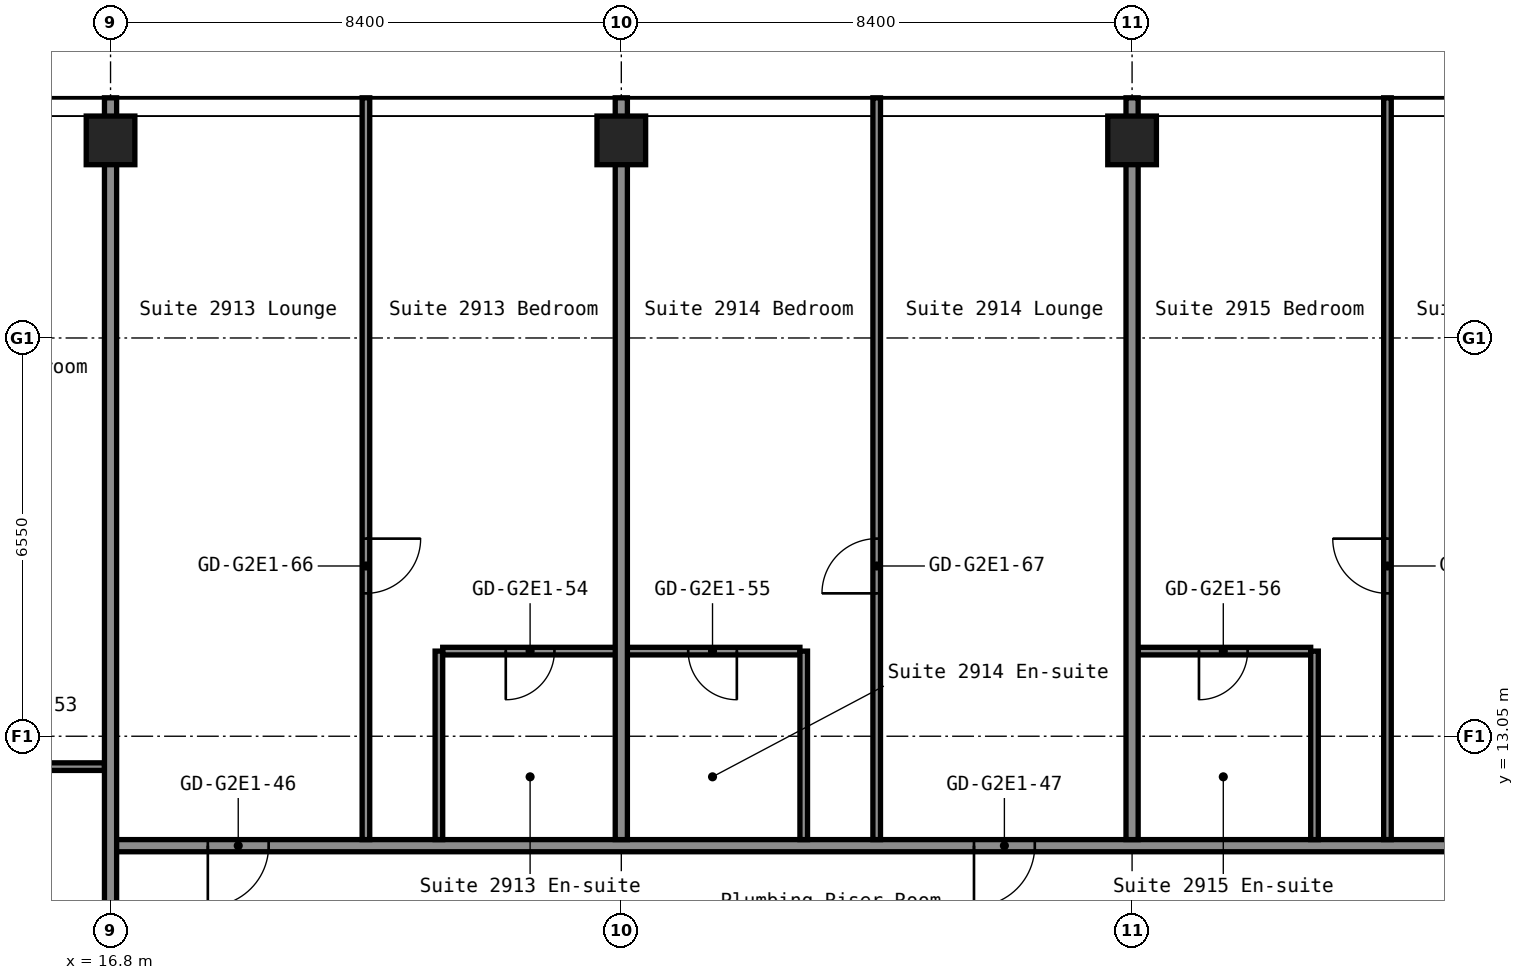
"""IFC4 building model, lengths in metres.
Left out: names, types, materials, properties, quantities, classifications, styles, units other than length and angle.
Written with IfcOpenShell. Run it as: python <this file> out.ifc"""

import sys

from ifc_helpers import new_model, si_unit, direction, frame, frame_2d, origin, origin_2d, place, context, subcontext, project, spatial, rectangle, hollow_rectangle, extrude, element, fill, save


model = new_model("IFC4")
c1 = context("Model", 3, precision=1e-05, world=origin(), true_north=direction((0.0, 1.0)))
c2 = subcontext(c1, "Body", "Model", "MODEL_VIEW")
j1 = project(units=[si_unit("LENGTHUNIT", "METRE"), si_unit("PLANEANGLEUNIT", "RADIAN")], contexts=[c1])
p1 = place(None, origin())
s1 = spatial("IfcSite", under=j1, at=p1, CompositionType="ELEMENT")
p2 = place(p1, origin())
s2 = spatial("IfcBuilding", under=s1, at=p2, CompositionType="ELEMENT")
p3 = place(p2, frame((0.0, 0.0, 104.2)))
s3 = spatial("IfcBuildingStorey", under=s2, at=p3, CompositionType="ELEMENT", Elevation=104.2)
for number, where, z_axis, x_axis in (
    (1, (16.8, 22.85, 0.0), (0.0, 0.0, 1.0), (1.0, 0.0, 0.0)),
    (2, (25.2, 22.85, 0.0), (0.0, 0.0, 1.0), (1.0, 0.0, 0.0)),
    (3, (33.6, 22.85, 0.0), (0.0, 0.0, 1.0), (1.0, 0.0, 0.0)),
):
    element("IfcColumn", number, at=place(p3, frame(where, z_axis=z_axis, x_axis=x_axis)), inside=s3, PredefinedType="COLUMN", context=c2, shape_type="SweptSolid", body=[
        extrude(hollow_rectangle(XDim=0.8, YDim=0.8, WallThickness=0.032, at=origin_2d()), origin(), (0.0, 0.0, 1.0), 2.8),
    ])
p4 = place(p3, frame((16.8, 11.25, 0.0), z_axis=(0.0, 0.0, 1.0), x_axis=(1.0, 0.0, 0.0)))
e4 = element("IfcWall", 4, at=p4, inside=s3, PredefinedType="PARTITIONING", context=c2, shape_type="SweptSolid", body=[
    extrude(rectangle(XDim=29.7, YDim=0.2, at=frame_2d((14.85, 0.0))), origin(), (0.0, 0.0, 1.0), 2.8),
])
p5 = place(p4, frame((1.6, 0.0, 0.0)))
e5 = element("IfcOpeningElement", 5, at=p5, cuts=e4, PredefinedType="OPENING", context=c2, shape_type="SweptSolid", body=[
    extrude(rectangle(XDim=1.0, YDim=2.1, at=frame_2d((0.5, 1.05))), frame((0.0, 0.11, 0.0), z_axis=(0.0, -1.0, 0.0), x_axis=(1.0, 0.0, 0.0)), (0.0, 0.0, 1.0), 0.22),
])
p6 = place(p4, frame((14.2, 0.0, 0.0)))
e6 = element("IfcOpeningElement", 6, at=p6, cuts=e4, PredefinedType="OPENING", context=c2, shape_type="SweptSolid", body=[
    extrude(rectangle(XDim=1.0, YDim=2.1, at=frame_2d((0.5, 1.05))), frame((0.0, 0.11, 0.0), z_axis=(0.0, -1.0, 0.0), x_axis=(1.0, 0.0, 0.0)), (0.0, 0.0, 1.0), 0.22),
])
p7 = place(p4, frame((22.6, 0.0, 0.0)))
e7 = element("IfcOpeningElement", 7, at=p7, cuts=e4, PredefinedType="OPENING", context=c2, shape_type="SweptSolid", body=[
    extrude(rectangle(XDim=1.0, YDim=2.1, at=frame_2d((0.5, 1.05))), frame((0.0, 0.11, 0.0), z_axis=(0.0, -1.0, 0.0), x_axis=(1.0, 0.0, 0.0)), (0.0, 0.0, 1.0), 0.22),
])
p8 = place(p4, frame((26.85, 0.0, 0.0)))
e8 = element("IfcOpeningElement", 8, at=p8, cuts=e4, PredefinedType="OPENING", context=c2, shape_type="SweptSolid", body=[
    extrude(rectangle(XDim=0.9, YDim=2.1, at=frame_2d((0.45, 1.05))), frame((0.0, 0.11, 0.0), z_axis=(0.0, -1.0, 0.0), x_axis=(1.0, 0.0, 0.0)), (0.0, 0.0, 1.0), 0.22),
])
p9 = place(p3, frame((13.863, 12.55, 0.0), z_axis=(0.0, 0.0, 1.0), x_axis=(1.0, 0.0, 0.0)))
e9 = element("IfcWall", 9, at=p9, inside=s3, PredefinedType="PARTITIONING", context=c2, shape_type="SweptSolid", body=[
    extrude(rectangle(XDim=2.837, YDim=0.125, at=frame_2d((1.419, 0.0))), origin(), (0.0, 0.0, 1.0), 2.8),
])
p10 = place(p9, frame((1.038, 0.0, 0.0)))
e10 = element("IfcOpeningElement", 10, at=p10, cuts=e9, PredefinedType="OPENING", context=c2, shape_type="SweptSolid", body=[
    extrude(rectangle(XDim=0.8, YDim=2.1, at=frame_2d((0.4, 1.05))), frame((0.0, 0.073, 0.0), z_axis=(0.0, -1.0, 0.0), x_axis=(1.0, 0.0, 0.0)), (0.0, 0.0, 1.0), 0.145),
])
p11 = place(p3, frame((22.262, 14.45, 0.0), z_axis=(0.0, 0.0, 1.0), x_axis=(1.0, 0.0, 0.0)))
e11 = element("IfcWall", 11, at=p11, inside=s3, PredefinedType="PARTITIONING", context=c2, shape_type="SweptSolid", body=[
    extrude(rectangle(XDim=5.875, YDim=0.125, at=frame_2d((2.938, 0.0))), origin(), (0.0, 0.0, 1.0), 2.8),
])
p12 = place(p11, frame((1.038, 0.0, 0.0)))
e12 = element("IfcOpeningElement", 12, at=p12, cuts=e11, PredefinedType="OPENING", context=c2, shape_type="SweptSolid", body=[
    extrude(rectangle(XDim=0.8, YDim=2.1, at=frame_2d((0.4, 1.05))), frame((0.0, 0.073, 0.0), z_axis=(0.0, -1.0, 0.0), x_axis=(1.0, 0.0, 0.0)), (0.0, 0.0, 1.0), 0.145),
])
p13 = place(p11, frame((4.038, 0.0, 0.0)))
e13 = element("IfcOpeningElement", 13, at=p13, cuts=e11, PredefinedType="OPENING", context=c2, shape_type="SweptSolid", body=[
    extrude(rectangle(XDim=0.8, YDim=2.1, at=frame_2d((0.4, 1.05))), frame((0.0, 0.073, 0.0), z_axis=(0.0, -1.0, 0.0), x_axis=(1.0, 0.0, 0.0)), (0.0, 0.0, 1.0), 0.145),
])
p14 = place(p3, frame((33.7, 14.45, 0.0), z_axis=(0.0, 0.0, 1.0), x_axis=(1.0, 0.0, 0.0)))
e14 = element("IfcWall", 14, at=p14, inside=s3, PredefinedType="PARTITIONING", context=c2, shape_type="SweptSolid", body=[
    extrude(rectangle(XDim=2.838, YDim=0.125, at=frame_2d((1.419, 0.0))), origin(), (0.0, 0.0, 1.0), 2.8),
])
p15 = place(p14, frame((1.0, 0.0, 0.0)))
e15 = element("IfcOpeningElement", 15, at=p15, cuts=e14, PredefinedType="OPENING", context=c2, shape_type="SweptSolid", body=[
    extrude(rectangle(XDim=0.8, YDim=2.1, at=frame_2d((0.4, 1.05))), frame((0.0, 0.073, 0.0), z_axis=(0.0, -1.0, 0.0), x_axis=(1.0, 0.0, 0.0)), (0.0, 0.0, 1.0), 0.145),
])
p16 = place(p3, frame((16.8, 10.19, 0.0), z_axis=(0.0, 0.0, 1.0), x_axis=(0.0, 1.0, 0.0)))
e16 = element("IfcWall", 16, at=p16, inside=s3, PredefinedType="PARTITIONING", context=c2, shape_type="SweptSolid", body=[
    extrude(rectangle(XDim=13.36, YDim=0.2, at=frame_2d((6.68, 0.0))), origin(), (0.0, 0.0, 1.0), 2.8),
])
p17 = place(p3, frame((21.0, 11.35, 0.0), z_axis=(0.0, 0.0, 1.0), x_axis=(0.0, 1.0, 0.0)))
e17 = element("IfcWall", 17, at=p17, inside=s3, PredefinedType="PARTITIONING", context=c2, shape_type="SweptSolid", body=[
    extrude(rectangle(XDim=12.2, YDim=0.125, at=frame_2d((6.1, 0.0))), origin(), (0.0, 0.0, 1.0), 2.8),
])
p18 = place(p17, frame((4.05, 0.0, 0.0)))
e18 = element("IfcOpeningElement", 18, at=p18, cuts=e17, PredefinedType="OPENING", context=c2, shape_type="SweptSolid", body=[
    extrude(rectangle(XDim=0.9, YDim=2.1, at=frame_2d((0.45, 1.05))), frame((0.0, 0.073, 0.0), z_axis=(0.0, -1.0, 0.0), x_axis=(1.0, 0.0, 0.0)), (0.0, 0.0, 1.0), 0.145),
])
p19 = place(p3, frame((22.2, 11.35, 0.0), z_axis=(0.0, 0.0, 1.0), x_axis=(0.0, 1.0, 0.0)))
e19 = element("IfcWall", 19, at=p19, inside=s3, PredefinedType="PARTITIONING", context=c2, shape_type="SweptSolid", body=[
    extrude(rectangle(XDim=3.1, YDim=0.125, at=frame_2d((1.55, 0.0))), origin(), (0.0, 0.0, 1.0), 2.8),
])
p20 = place(p3, frame((25.2, 11.35, 0.0), z_axis=(0.0, 0.0, 1.0), x_axis=(0.0, 1.0, 0.0)))
e20 = element("IfcWall", 20, at=p20, inside=s3, PredefinedType="PARTITIONING", context=c2, shape_type="SweptSolid", body=[
    extrude(rectangle(XDim=12.2, YDim=0.2, at=frame_2d((6.1, 0.0))), origin(), (0.0, 0.0, 1.0), 2.8),
])
p21 = place(p3, frame((28.2, 11.35, 0.0), z_axis=(0.0, 0.0, 1.0), x_axis=(0.0, 1.0, 0.0)))
e21 = element("IfcWall", 21, at=p21, inside=s3, PredefinedType="PARTITIONING", context=c2, shape_type="SweptSolid", body=[
    extrude(rectangle(XDim=3.1, YDim=0.125, at=frame_2d((1.55, 0.0))), origin(), (0.0, 0.0, 1.0), 2.8),
])
p22 = place(p3, frame((29.4, 11.35, 0.0), z_axis=(0.0, 0.0, 1.0), x_axis=(0.0, 1.0, 0.0)))
e22 = element("IfcWall", 22, at=p22, inside=s3, PredefinedType="PARTITIONING", context=c2, shape_type="SweptSolid", body=[
    extrude(rectangle(XDim=12.2, YDim=0.125, at=frame_2d((6.1, 0.0))), origin(), (0.0, 0.0, 1.0), 2.8),
])
p23 = place(p22, frame((4.05, 0.0, 0.0)))
e23 = element("IfcOpeningElement", 23, at=p23, cuts=e22, PredefinedType="OPENING", context=c2, shape_type="SweptSolid", body=[
    extrude(rectangle(XDim=0.9, YDim=2.1, at=frame_2d((0.45, 1.05))), frame((0.0, 0.073, 0.0), z_axis=(0.0, -1.0, 0.0), x_axis=(1.0, 0.0, 0.0)), (0.0, 0.0, 1.0), 0.145),
])
p24 = place(p3, frame((33.6, 11.35, 0.0), z_axis=(0.0, 0.0, 1.0), x_axis=(0.0, 1.0, 0.0)))
e24 = element("IfcWall", 24, at=p24, inside=s3, PredefinedType="PARTITIONING", context=c2, shape_type="SweptSolid", body=[
    extrude(rectangle(XDim=12.2, YDim=0.2, at=frame_2d((6.1, 0.0))), origin(), (0.0, 0.0, 1.0), 2.8),
])
p25 = place(p3, frame((36.6, 11.35, 0.0), z_axis=(0.0, 0.0, 1.0), x_axis=(0.0, 1.0, 0.0)))
e25 = element("IfcWall", 25, at=p25, inside=s3, PredefinedType="PARTITIONING", context=c2, shape_type="SweptSolid", body=[
    extrude(rectangle(XDim=3.1, YDim=0.125, at=frame_2d((1.55, 0.0))), origin(), (0.0, 0.0, 1.0), 2.8),
])
p26 = place(p3, frame((37.8, 11.35, 0.0), z_axis=(0.0, 0.0, 1.0), x_axis=(0.0, 1.0, 0.0)))
e26 = element("IfcWall", 26, at=p26, inside=s3, PredefinedType="PARTITIONING", context=c2, shape_type="SweptSolid", body=[
    extrude(rectangle(XDim=12.2, YDim=0.125, at=frame_2d((6.1, 0.0))), origin(), (0.0, 0.0, 1.0), 2.8),
])
p27 = place(p26, frame((4.05, 0.0, 0.0)))
e27 = element("IfcOpeningElement", 27, at=p27, cuts=e26, PredefinedType="OPENING", context=c2, shape_type="SweptSolid", body=[
    extrude(rectangle(XDim=0.9, YDim=2.1, at=frame_2d((0.45, 1.05))), frame((0.0, 0.073, 0.0), z_axis=(0.0, -1.0, 0.0), x_axis=(1.0, 0.0, 0.0)), (0.0, 0.0, 1.0), 0.145),
])
p28 = place(p5, origin())
e28 = element("IfcDoor", 28, at=p28, inside=s3, OperationType="SINGLE_SWING_LEFT", PredefinedType="DOOR", context=c2, shape_type="SweptSolid", body=[
    extrude(rectangle(XDim=1.0, YDim=2.1, at=frame_2d((0.5, 1.05))), frame((0.0, 0.025, 0.0), z_axis=(0.0, -1.0, 0.0), x_axis=(1.0, 0.0, 0.0)), (0.0, 0.0, 1.0), 0.05),
])
fill(e5, e28)
p29 = place(p6, origin())
e29 = element("IfcDoor", 29, at=p29, inside=s3, OperationType="SINGLE_SWING_LEFT", PredefinedType="DOOR", context=c2, shape_type="SweptSolid", body=[
    extrude(rectangle(XDim=1.0, YDim=2.1, at=frame_2d((0.5, 1.05))), frame((0.0, 0.025, 0.0), z_axis=(0.0, -1.0, 0.0), x_axis=(1.0, 0.0, 0.0)), (0.0, 0.0, 1.0), 0.05),
])
fill(e6, e29)
p30 = place(p12, origin())
e30 = element("IfcDoor", 30, at=p30, inside=s3, OperationType="SINGLE_SWING_LEFT", PredefinedType="DOOR", context=c2, shape_type="SweptSolid", body=[
    extrude(rectangle(XDim=0.8, YDim=2.1, at=frame_2d((0.4, 1.05))), frame((0.0, 0.025, 0.0), z_axis=(0.0, -1.0, 0.0), x_axis=(1.0, 0.0, 0.0)), (0.0, 0.0, 1.0), 0.05),
])
fill(e12, e30)
p31 = place(p13, origin())
e31 = element("IfcDoor", 31, at=p31, inside=s3, OperationType="SINGLE_SWING_RIGHT", PredefinedType="DOOR", context=c2, shape_type="SweptSolid", body=[
    extrude(rectangle(XDim=0.8, YDim=2.1, at=frame_2d((0.4, 1.05))), frame((0.0, 0.025, 0.0), z_axis=(0.0, -1.0, 0.0), x_axis=(1.0, 0.0, 0.0)), (0.0, 0.0, 1.0), 0.05),
])
fill(e13, e31)
p32 = place(p15, origin())
e32 = element("IfcDoor", 32, at=p32, inside=s3, OperationType="SINGLE_SWING_LEFT", PredefinedType="DOOR", context=c2, shape_type="SweptSolid", body=[
    extrude(rectangle(XDim=0.8, YDim=2.1, at=frame_2d((0.4, 1.05))), frame((0.0, 0.025, 0.0), z_axis=(0.0, -1.0, 0.0), x_axis=(1.0, 0.0, 0.0)), (0.0, 0.0, 1.0), 0.05),
])
fill(e15, e32)
p33 = place(p18, origin())
e33 = element("IfcDoor", 33, at=p33, inside=s3, OperationType="SINGLE_SWING_RIGHT", PredefinedType="DOOR", context=c2, shape_type="SweptSolid", body=[
    extrude(rectangle(XDim=0.9, YDim=2.1, at=frame_2d((0.45, 1.05))), frame((0.0, 0.025, 0.0), z_axis=(0.0, -1.0, 0.0), x_axis=(1.0, 0.0, 0.0)), (0.0, 0.0, 1.0), 0.05),
])
fill(e18, e33)
p34 = place(p23, origin())
e34 = element("IfcDoor", 34, at=p34, inside=s3, OperationType="SINGLE_SWING_RIGHT", PredefinedType="DOOR", context=c2, shape_type="SweptSolid", body=[
    extrude(rectangle(XDim=0.9, YDim=2.1, at=frame_2d((0.45, 1.05))), frame((0.0, 0.025, 0.0), z_axis=(0.0, -1.0, 0.0), x_axis=(1.0, 0.0, 0.0)), (0.0, 0.0, 1.0), 0.05),
])
fill(e23, e34)
p35 = place(p27, origin())
e35 = element("IfcDoor", 35, at=p35, inside=s3, OperationType="SINGLE_SWING_LEFT", PredefinedType="DOOR", context=c2, shape_type="SweptSolid", body=[
    extrude(rectangle(XDim=0.9, YDim=2.1, at=frame_2d((0.45, 1.05))), frame((0.0, 0.025, 0.0), z_axis=(0.0, -1.0, 0.0), x_axis=(1.0, 0.0, 0.0)), (0.0, 0.0, 1.0), 0.05),
])
fill(e27, e35)
save(model, sys.argv[1])
